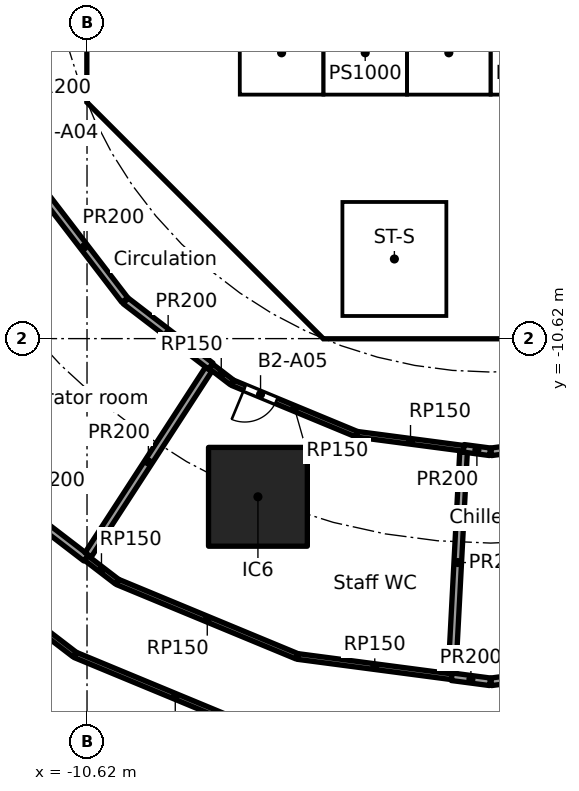
"""IFC4 building model, lengths in metres.
Left out: names, types, materials, properties, quantities, classifications, styles, units other than length and angle.
Written with IfcOpenShell. Run it as: python <this file> out.ifc"""

import sys

from ifc_helpers import new_model, si_unit, direction, frame, frame_2d, origin, origin_2d, place, context, subcontext, project, spatial, polyline, rectangle, outline, extrude, element, fill, save


model = new_model("IFC4")
c1 = context("Model", 3, precision=1e-05, world=origin(), true_north=direction((0.0, 1.0)))
c2 = subcontext(c1, "Body", "Model", "MODEL_VIEW")
j1 = project(units=[si_unit("LENGTHUNIT", "METRE"), si_unit("PLANEANGLEUNIT", "RADIAN")], contexts=[c1])
p1 = place(None, origin())
s1 = spatial("IfcSite", under=j1, at=p1, CompositionType="ELEMENT")
p2 = place(p1, origin())
s2 = spatial("IfcBuilding", under=s1, at=p2, CompositionType="ELEMENT")
p3 = place(p2, frame((0.0, 0.0, -10.0)))
s3 = spatial("IfcBuildingStorey", under=s2, at=p3, CompositionType="ELEMENT", Elevation=-10.0)
p4 = place(p3, frame((-6.123, -14.782, 0.0), z_axis=(0.0, 0.0, 1.0), x_axis=(1.0, 0.0, 0.0)))
e1 = element("IfcColumn", 1, at=p4, inside=s3, PredefinedType="COLUMN", context=c2, shape_type="SweptSolid", body=[
    extrude(rectangle(XDim=2.6, YDim=2.6, at=origin_2d()), origin(), (0.0, 0.0, 1.0), 5.0),
])
p5 = place(p3, frame((-10.325, 3.801, 0.0), z_axis=(0.0, 0.0, 1.0), x_axis=(0.0, -1.0, 0.0)))
e2 = element("IfcWall", 2, at=p5, inside=s3, PredefinedType="SHEAR", context=c2, shape_type="SweptSolid", body=[
    extrude(rectangle(XDim=7.602, YDim=0.6, at=frame_2d((3.801, 0.0))), origin(), (0.0, 0.0, 1.0), 4.6),
])
p6 = place(p5, frame((0.651, 0.0, 0.0)))
e3 = element("IfcOpeningElement", 3, at=p6, cuts=e2, PredefinedType="OPENING", context=c2, shape_type="SweptSolid", body=[
    extrude(rectangle(XDim=1.5, YDim=2.1, at=frame_2d((0.75, 1.05))), frame((0.0, 0.31, 0.0), z_axis=(0.0, -1.0, 0.0), x_axis=(1.0, 0.0, 0.0)), (0.0, 0.0, 1.0), 0.62),
])
p7 = place(p5, frame((5.451, 0.0, 0.0)))
e4 = element("IfcOpeningElement", 4, at=p7, cuts=e2, PredefinedType="OPENING", context=c2, shape_type="SweptSolid", body=[
    extrude(rectangle(XDim=1.5, YDim=2.1, at=frame_2d((0.75, 1.05))), frame((0.0, 0.31, 0.0), z_axis=(0.0, -1.0, 0.0), x_axis=(1.0, 0.0, 0.0)), (0.0, 0.0, 1.0), 0.62),
])
p8 = place(p3, frame((-9.988, -4.613, 0.0), z_axis=(0.0, 0.0, 1.0), x_axis=(0.707106781187, -0.707106781187, 0.0)))
e5 = element("IfcWall", 5, at=p8, inside=s3, PredefinedType="SHEAR", context=c2, shape_type="SweptSolid", body=[
    extrude(rectangle(XDim=7.602, YDim=0.6, at=frame_2d((3.801, 0.0))), origin(), (0.0, 0.0, 1.0), 4.6),
])
p9 = place(p8, frame((6.151, 0.0, 0.0)))
e6 = element("IfcOpeningElement", 6, at=p9, cuts=e5, PredefinedType="OPENING", context=c2, shape_type="SweptSolid", body=[
    extrude(rectangle(XDim=1.1, YDim=2.1, at=frame_2d((0.55, 1.05))), frame((0.0, 0.31, 0.0), z_axis=(0.0, -1.0, 0.0), x_axis=(1.0, 0.0, 0.0)), (0.0, 0.0, 1.0), 0.62),
])
p10 = place(p3, frame((-5.8, -8.227, 0.0), z_axis=(0.0, 0.0, 1.0), x_axis=(0.0, 1.0, 0.0)))
e7 = element("IfcWall", 7, at=p10, inside=s3, PredefinedType="PARTITIONING", context=c2, shape_type="SweptSolid", body=[
    extrude(rectangle(XDim=3.927, YDim=0.15, at=frame_2d((1.963, 0.0))), origin(), (0.0, 0.0, 1.0), 4.6),
])
p11 = place(p10, frame((2.615, 0.0, 0.0)))
e8 = element("IfcOpeningElement", 8, at=p11, cuts=e7, PredefinedType="OPENING", context=c2, shape_type="SweptSolid", body=[
    extrude(rectangle(XDim=0.9, YDim=2.1, at=frame_2d((0.45, 1.05))), frame((0.0, 0.085, 0.0), z_axis=(0.0, -1.0, 0.0), x_axis=(1.0, 0.0, 0.0)), (0.0, 0.0, 1.0), 0.17),
])
p12 = place(p10, frame((0.539, 0.0, 0.0)))
e9 = element("IfcOpeningElement", 9, at=p12, cuts=e7, PredefinedType="OPENING", context=c2, shape_type="SweptSolid", body=[
    extrude(rectangle(XDim=0.9, YDim=2.1, at=frame_2d((0.45, 1.05))), frame((0.0, 0.085, 0.0), z_axis=(0.0, -1.0, 0.0), x_axis=(1.0, 0.0, 0.0)), (0.0, 0.0, 1.0), 0.17),
])
p13 = place(p3, frame((-4.0, -6.5, 0.0), z_axis=(0.0, 0.0, 1.0), x_axis=(0.0, 1.0, 0.0)))
e10 = element("IfcWall", 10, at=p13, inside=s3, PredefinedType="SOLIDWALL", context=c2, shape_type="SweptSolid", body=[
    extrude(rectangle(XDim=2.2, YDim=0.2, at=frame_2d((1.1, 0.0))), origin(), (0.0, 0.0, 1.0), 4.6),
])
p14 = place(p13, frame((0.65, 0.0, 0.0)))
e11 = element("IfcOpeningElement", 11, at=p14, cuts=e10, PredefinedType="OPENING", context=c2, shape_type="SweptSolid", body=[
    extrude(rectangle(XDim=0.9, YDim=2.1, at=frame_2d((0.45, 1.05))), frame((0.0, 0.11, 0.0), z_axis=(0.0, -1.0, 0.0), x_axis=(1.0, 0.0, 0.0)), (0.0, 0.0, 1.0), 0.22),
])
p15 = place(p3, origin())
e12 = element("IfcWall", 12, at=p15, inside=s3, PredefinedType="SHEAR", context=c2, shape_type="SweptSolid", body=[
    extrude(outline(polyline([(-10.625, -3.801), (-10.025, -3.801), (-10.025, -4.152), (-9.776, -4.401), (-10.2, -4.825), (-10.625, -4.401), (-10.625, -3.801)])), origin(), (0.0, 0.0, 1.0), 4.6),
])
p16 = place(p3, origin())
e13 = element("IfcWall", 13, at=p16, inside=s3, PredefinedType="SHEAR", context=c2, shape_type="SweptSolid", body=[
    extrude(outline(polyline([(-4.152, -10.025), (4.152, -10.025), (4.401, -9.776), (4.825, -10.2), (4.401, -10.625), (-4.401, -10.625), (-4.825, -10.2), (-4.401, -9.776), (-4.152, -10.025)])), origin(), (0.0, 0.0, 1.0), 4.6),
])
p17 = place(p3, frame((-0.9, -6.5, 0.0), z_axis=(0.0, 0.0, 1.0), x_axis=(0.0, 1.0, 0.0)))
e14 = element("IfcWall", 14, at=p17, inside=s3, PredefinedType="SOLIDWALL", context=c2, shape_type="SweptSolid", body=[
    extrude(rectangle(XDim=2.2, YDim=0.2, at=frame_2d((1.1, 0.0))), origin(), (0.0, 0.0, 1.0), 4.6),
])
p18 = place(p3, origin())
e15 = element("IfcWall", 15, at=p18, inside=s3, PredefinedType="SOLIDWALL", context=c2, shape_type="SweptSolid", body=[
    extrude(outline(polyline([(-6.7, -2.1), (-6.5, -2.1), (-6.5, -4.1), (-4.5, -4.1), (-4.5, -2.1), (-4.3, -2.1), (-4.3, -4.1), (-2.3, -4.1), (-2.3, -2.1), (-2.1, -2.1), (-2.1, -4.1), (-0.1, -4.1), (-0.1, -2.1), (0.1, -2.1), (0.1, -4.1), (2.1, -4.1), (2.1, -2.1), (2.3, -2.1), (2.3, -4.1), (4.3, -4.1), (4.3, -2.1), (4.5, -2.1), (4.5, -4.1), (6.5, -4.1), (6.5, -2.1), (6.7, -2.1), (6.7, -4.3), (-6.7, -4.3), (-6.7, -2.1)])), origin(), (0.0, 0.0, 1.0), 4.6),
])
p19 = place(p3, frame((-10.025, -4.0, 0.0), z_axis=(0.0, 0.0, 1.0), x_axis=(1.0, 0.0, 0.0)))
e16 = element("IfcWall", 16, at=p19, inside=s3, PredefinedType="PARTITIONING", context=c2, shape_type="SweptSolid", body=[
    extrude(rectangle(XDim=3.325, YDim=0.2, at=frame_2d((1.662, 0.0))), origin(), (0.0, 0.0, 1.0), 4.6),
])
p20 = place(p3, frame((-8.001, -6.1, 0.0), z_axis=(0.0, 0.0, 1.0), x_axis=(1.0, 0.0, 0.0)))
e17 = element("IfcWall", 17, at=p20, inside=s3, PredefinedType="PARTITIONING", context=c2, shape_type="SweptSolid", body=[
    extrude(rectangle(XDim=2.126, YDim=0.15, at=frame_2d((1.063, 0.0))), origin(), (0.0, 0.0, 1.0), 4.6),
])
p21 = place(p3, origin())
e18 = element("IfcWall", 18, at=p21, inside=s3, PredefinedType="SOLIDWALL", context=c2, shape_type="SweptSolid", body=[
    extrude(outline(polyline([(-3.9, -10.025), (-4.1, -10.025), (-4.1, -7.025), (-3.9, -7.025), (-3.9, -10.025)])), origin(), (0.0, 0.0, 1.0), 4.6),
])
p22 = place(p3, origin())
e19 = element("IfcWall", 19, at=p22, inside=s3, PredefinedType="SOLIDWALL", context=c2, shape_type="SweptSolid", body=[
    extrude(outline(polyline([(4.1, -7.025), (-4.1, -7.025), (-4.1, -6.5), (4.1, -6.5), (4.1, -7.025)])), origin(), (0.0, 0.0, 1.0), 4.6),
])
p23 = place(p3, frame((0.0, 0.0, -2.0)))
e20 = element("IfcWall", 20, at=p23, inside=s3, PredefinedType="SOLIDWALL", context=c2, shape_type="SweptSolid", body=[
    extrude(outline(polyline([(-4.4, -4.2), (-6.6, -4.2), (-6.6, -2.0), (-4.4, -2.0), (-4.4, -4.2)]), holes=[polyline([(-4.5, -4.1), (-4.5, -2.1), (-6.5, -2.1), (-6.5, -4.1), (-4.5, -4.1)])]), origin(), (0.0, 0.0, 1.0), 2.0),
])
p24 = place(p3, frame((0.0, 0.0, -2.0)))
e21 = element("IfcWall", 21, at=p24, inside=s3, PredefinedType="SOLIDWALL", context=c2, shape_type="SweptSolid", body=[
    extrude(outline(polyline([(-2.2, -4.2), (-4.4, -4.2), (-4.4, -2.0), (-2.2, -2.0), (-2.2, -4.2)]), holes=[polyline([(-2.3, -4.1), (-2.3, -2.1), (-4.3, -2.1), (-4.3, -4.1), (-2.3, -4.1)])]), origin(), (0.0, 0.0, 1.0), 2.0),
])
p25 = place(p3, frame((0.0, 0.0, -2.0)))
e22 = element("IfcWall", 22, at=p25, inside=s3, PredefinedType="SOLIDWALL", context=c2, shape_type="SweptSolid", body=[
    extrude(outline(polyline([(0.0, -4.2), (-2.2, -4.2), (-2.2, -2.0), (0.0, -2.0), (0.0, -4.2)]), holes=[polyline([(-0.1, -4.1), (-0.1, -2.1), (-2.1, -2.1), (-2.1, -4.1), (-0.1, -4.1)])]), origin(), (0.0, 0.0, 1.0), 2.0),
])
p26 = place(p3, frame((0.0, 0.0, -2.0)))
e23 = element("IfcWall", 23, at=p26, inside=s3, PredefinedType="SOLIDWALL", context=c2, shape_type="SweptSolid", body=[
    extrude(outline(polyline([(2.2, -4.2), (0.0, -4.2), (0.0, -2.0), (2.2, -2.0), (2.2, -4.2)]), holes=[polyline([(2.1, -4.1), (2.1, -2.1), (0.1, -2.1), (0.1, -4.1), (2.1, -4.1)])]), origin(), (0.0, 0.0, 1.0), 2.0),
])
p27 = place(p3, frame((-10.945, -18.933, 0.0), z_axis=(0.0, 0.0, 1.0), x_axis=(-0.793356107398, 0.608757822828, 0.0)))
e24 = element("IfcWall", 24, at=p27, inside=s3, PredefinedType="PARTITIONING", context=c2, shape_type="SweptSolid", body=[
    extrude(rectangle(XDim=5.686, YDim=0.15, at=frame_2d((2.843, 0.0))), origin(), (0.0, 0.0, 1.0), 4.6),
])
p28 = place(p3, frame((-10.644, -16.391, 0.0), z_axis=(0.0, 0.0, 1.0), x_axis=(0.793344280216, -0.608773236147, 0.0)))
e25 = element("IfcWall", 25, at=p28, inside=s3, PredefinedType="PARTITIONING", context=c2, shape_type="SweptSolid", body=[
    extrude(rectangle(XDim=1.02, YDim=0.15, at=frame_2d((0.51, 0.0))), origin(), (0.0, 0.0, 1.0), 4.6),
])
p29 = place(p3, frame((-9.815, -17.023, 0.0), z_axis=(0.0, 0.0, 1.0), x_axis=(0.923883976017, -0.382672704618, 0.0)))
e26 = element("IfcWall", 26, at=p29, inside=s3, PredefinedType="PARTITIONING", context=c2, shape_type="SweptSolid", body=[
    extrude(rectangle(XDim=5.106, YDim=0.15, at=frame_2d((2.553, 0.0))), origin(), (0.0, 0.0, 1.0), 4.6),
])
p30 = place(p3, frame((-6.809, -11.771, 0.0), z_axis=(0.0, 0.0, 1.0), x_axis=(-0.793360087844, 0.608752635326, 0.0)))
e27 = element("IfcWall", 27, at=p30, inside=s3, PredefinedType="PARTITIONING", context=c2, shape_type="SweptSolid", body=[
    extrude(rectangle(XDim=0.702, YDim=0.15, at=frame_2d((0.351, 0.0))), origin(), (0.0, 0.0, 1.0), 4.6),
])
p31 = place(p3, frame((-5.672, -21.121, 0.0), z_axis=(0.0, 0.0, 1.0), x_axis=(-0.923876568882, 0.38269058712, 0.0)))
e28 = element("IfcWall", 28, at=p31, inside=s3, PredefinedType="PARTITIONING", context=c2, shape_type="SweptSolid", body=[
    extrude(rectangle(XDim=5.686, YDim=0.15, at=frame_2d((2.843, 0.0))), origin(), (0.0, 0.0, 1.0), 4.6),
])
p32 = place(p3, frame((-5.074, -18.984, 0.0), z_axis=(0.0, 0.0, 1.0), x_axis=(0.991443107789, -0.13053951133, 0.0)))
e29 = element("IfcWall", 29, at=p32, inside=s3, PredefinedType="PARTITIONING", context=c2, shape_type="SweptSolid", body=[
    extrude(rectangle(XDim=4.086, YDim=0.15, at=frame_2d((2.043, 0.0))), origin(), (0.0, 0.0, 1.0), 4.6),
])
p33 = place(p3, frame((-3.531, -13.132, 0.0), z_axis=(0.0, 0.0, 1.0), x_axis=(-0.923881838111, 0.382677866108, 0.0)))
e30 = element("IfcWall", 30, at=p33, inside=s3, PredefinedType="PARTITIONING", context=c2, shape_type="SweptSolid", body=[
    extrude(rectangle(XDim=3.527, YDim=0.15, at=frame_2d((1.763, 0.0))), origin(), (0.0, 0.0, 1.0), 4.6),
])
p34 = place(p33, frame((2.281, 0.0, 0.0)))
e31 = element("IfcOpeningElement", 31, at=p34, cuts=e30, PredefinedType="OPENING", context=c2, shape_type="SweptSolid", body=[
    extrude(rectangle(XDim=0.9, YDim=2.1, at=frame_2d((0.45, 1.05))), frame((0.0, 0.085, 0.0), z_axis=(0.0, -1.0, 0.0), x_axis=(1.0, 0.0, 0.0)), (0.0, 0.0, 1.0), 0.17),
])
p35 = place(p3, frame((-0.708, -13.507, 0.0), z_axis=(0.0, 0.0, 1.0), x_axis=(-0.991443994311, 0.130532778046, 0.0)))
e32 = element("IfcWall", 32, at=p35, inside=s3, PredefinedType="PARTITIONING", context=c2, shape_type="SweptSolid", body=[
    extrude(rectangle(XDim=2.824, YDim=0.15, at=frame_2d((1.412, 0.0))), origin(), (0.0, 0.0, 1.0), 4.6),
])
p36 = place(p3, frame((-13.884, -13.905, 0.0), z_axis=(0.0, 0.0, 1.0), x_axis=(0.79334357443, -0.608774155916, 0.0)))
e33 = element("IfcWall", 33, at=p36, inside=s3, PredefinedType="PARTITIONING", context=c2, shape_type="SweptSolid", body=[
    extrude(rectangle(XDim=4.083, YDim=0.2, at=frame_2d((2.042, 0.0))), origin(), (0.0, 0.0, 1.0), 4.6),
])
p37 = place(p3, frame((-10.59, -16.307, 0.0), z_axis=(0.0, 0.0, 1.0), x_axis=(0.544637259436, 0.838671721017, 0.0)))
e34 = element("IfcWall", 34, at=p37, inside=s3, PredefinedType="PARTITIONING", context=c2, shape_type="SweptSolid", body=[
    extrude(rectangle(XDim=5.818, YDim=0.2, at=frame_2d((2.909, 0.0))), origin(), (0.0, 0.0, 1.0), 4.6),
])
p38 = place(p3, frame((-9.626, -9.605, 0.0), z_axis=(0.0, 0.0, 1.0), x_axis=(-0.608697977542, 0.793402024283, 0.0)))
e35 = element("IfcWall", 35, at=p38, inside=s3, PredefinedType="PARTITIONING", context=c2, shape_type="SweptSolid", body=[
    extrude(rectangle(XDim=3.52, YDim=0.2, at=frame_2d((1.76, 0.0))), origin(), (0.0, 0.0, 1.0), 4.6),
])
p39 = place(p3, frame((-7.366, -11.343, 0.0), z_axis=(0.0, 0.0, 1.0), x_axis=(-0.793389024662, 0.608714921409, 0.0)))
e36 = element("IfcWall", 36, at=p39, inside=s3, PredefinedType="PARTITIONING", context=c2, shape_type="SweptSolid", body=[
    extrude(rectangle(XDim=2.821, YDim=0.2, at=frame_2d((1.411, 0.0))), origin(), (0.0, 0.0, 1.0), 4.6),
])
p40 = place(p3, frame((-1.023, -19.517, 0.0), z_axis=(0.0, 0.0, 1.0), x_axis=(0.991428116695, -0.130653317704, 0.0)))
e37 = element("IfcWall", 37, at=p40, inside=s3, PredefinedType="PARTITIONING", context=c2, shape_type="SweptSolid", body=[
    extrude(rectangle(XDim=1.017, YDim=0.2, at=frame_2d((0.508, 0.0))), origin(), (0.0, 0.0, 1.0), 4.6),
])
p41 = place(p3, frame((-0.713, -13.607, 0.0), z_axis=(0.0, 0.0, 1.0), x_axis=(-0.052327572808, -0.998629974077, 0.0)))
e38 = element("IfcWall", 38, at=p41, inside=s3, PredefinedType="PARTITIONING", context=c2, shape_type="SweptSolid", body=[
    extrude(rectangle(XDim=5.818, YDim=0.2, at=frame_2d((2.909, 0.0))), origin(), (0.0, 0.0, 1.0), 4.6),
])
p42 = place(p3, frame((0.015, -19.65, 0.0), z_axis=(0.0, 0.0, 1.0), x_axis=(0.991441907417, 0.13054862779, 0.0)))
e39 = element("IfcWall", 39, at=p42, inside=s3, PredefinedType="PARTITIONING", context=c2, shape_type="SweptSolid", body=[
    extrude(rectangle(XDim=5.1, YDim=0.2, at=frame_2d((2.55, 0.0))), origin(), (0.0, 0.0, 1.0), 4.6),
])
p43 = place(p3, frame((-0.015, -13.598, 0.0), z_axis=(0.0, 0.0, 1.0), x_axis=(-0.991473310532, 0.130309917135, 0.0)))
e40 = element("IfcWall", 40, at=p43, inside=s3, PredefinedType="PARTITIONING", context=c2, shape_type="SweptSolid", body=[
    extrude(rectangle(XDim=0.699, YDim=0.2, at=frame_2d((0.349, 0.0))), origin(), (0.0, 0.0, 1.0), 4.6),
])
p44 = place(p3, frame((3.505, -13.139, 0.0), z_axis=(0.0, 0.0, 1.0), x_axis=(-0.991452406768, -0.130468866457, 0.0)))
e41 = element("IfcWall", 41, at=p44, inside=s3, PredefinedType="PARTITIONING", context=c2, shape_type="SweptSolid", body=[
    extrude(rectangle(XDim=3.52, YDim=0.2, at=frame_2d((1.76, 0.0))), origin(), (0.0, 0.0, 1.0), 4.6),
])
p45 = place(p44, frame((1.16, 0.0, 0.0)))
e42 = element("IfcOpeningElement", 42, at=p45, cuts=e41, PredefinedType="OPENING", context=c2, shape_type="SweptSolid", body=[
    extrude(rectangle(XDim=1.2, YDim=2.1, at=frame_2d((0.6, 1.05))), frame((0.0, 0.11, 0.0), z_axis=(0.0, -1.0, 0.0), x_axis=(1.0, 0.0, 0.0)), (0.0, 0.0, 1.0), 0.22),
])
p46 = place(p11, origin())
e43 = element("IfcDoor", 43, at=p46, inside=s3, OperationType="SINGLE_SWING_RIGHT", PredefinedType="DOOR", context=c2, shape_type="SweptSolid", body=[
    extrude(rectangle(XDim=0.9, YDim=2.1, at=frame_2d((0.45, 1.05))), frame((0.0, 0.025, 0.0), z_axis=(0.0, -1.0, 0.0), x_axis=(1.0, 0.0, 0.0)), (0.0, 0.0, 1.0), 0.05),
])
fill(e8, e43)
p47 = place(p12, origin())
e44 = element("IfcDoor", 44, at=p47, inside=s3, OperationType="SINGLE_SWING_RIGHT", PredefinedType="DOOR", context=c2, shape_type="SweptSolid", body=[
    extrude(rectangle(XDim=0.9, YDim=2.1, at=frame_2d((0.45, 1.05))), frame((0.0, 0.025, 0.0), z_axis=(0.0, -1.0, 0.0), x_axis=(1.0, 0.0, 0.0)), (0.0, 0.0, 1.0), 0.05),
])
fill(e9, e44)
p48 = place(p14, frame((0.9, 0.0, 0.0), x_axis=(-1.0, 0.0, 0.0)))
e45 = element("IfcDoor", 45, at=p48, inside=s3, OperationType="SINGLE_SWING_LEFT", PredefinedType="DOOR", context=c2, shape_type="SweptSolid", body=[
    extrude(rectangle(XDim=0.9, YDim=2.1, at=frame_2d((0.45, 1.05))), frame((0.0, 0.025, 0.0), z_axis=(0.0, -1.0, 0.0), x_axis=(1.0, 0.0, 0.0)), (0.0, 0.0, 1.0), 0.05),
])
fill(e11, e45)
p49 = place(p7, origin())
e46 = element("IfcDoor", 46, at=p49, inside=s3, OperationType="DOUBLE_DOOR_SINGLE_SWING", PredefinedType="DOOR", context=c2, shape_type="SweptSolid", body=[
    extrude(rectangle(XDim=1.5, YDim=2.1, at=frame_2d((0.75, 1.05))), frame((0.0, 0.025, 0.0), z_axis=(0.0, -1.0, 0.0), x_axis=(1.0, 0.0, 0.0)), (0.0, 0.0, 1.0), 0.05),
])
fill(e4, e46)
p50 = place(p9, origin())
e47 = element("IfcDoor", 47, at=p50, inside=s3, OperationType="SINGLE_SWING_LEFT", PredefinedType="DOOR", context=c2, shape_type="SweptSolid", body=[
    extrude(rectangle(XDim=1.1, YDim=2.1, at=frame_2d((0.55, 1.05))), frame((0.0, 0.025, 0.0), z_axis=(0.0, -1.0, 0.0), x_axis=(1.0, 0.0, 0.0)), (0.0, 0.0, 1.0), 0.05),
])
fill(e6, e47)
p51 = place(p34, origin())
e48 = element("IfcDoor", 48, at=p51, inside=s3, OperationType="SINGLE_SWING_RIGHT", PredefinedType="DOOR", context=c2, shape_type="SweptSolid", body=[
    extrude(rectangle(XDim=0.9, YDim=2.1, at=frame_2d((0.45, 1.05))), frame((0.0, 0.025, 0.0), z_axis=(0.0, -1.0, 0.0), x_axis=(1.0, 0.0, 0.0)), (0.0, 0.0, 1.0), 0.05),
])
fill(e31, e48)
save(model, sys.argv[1])
